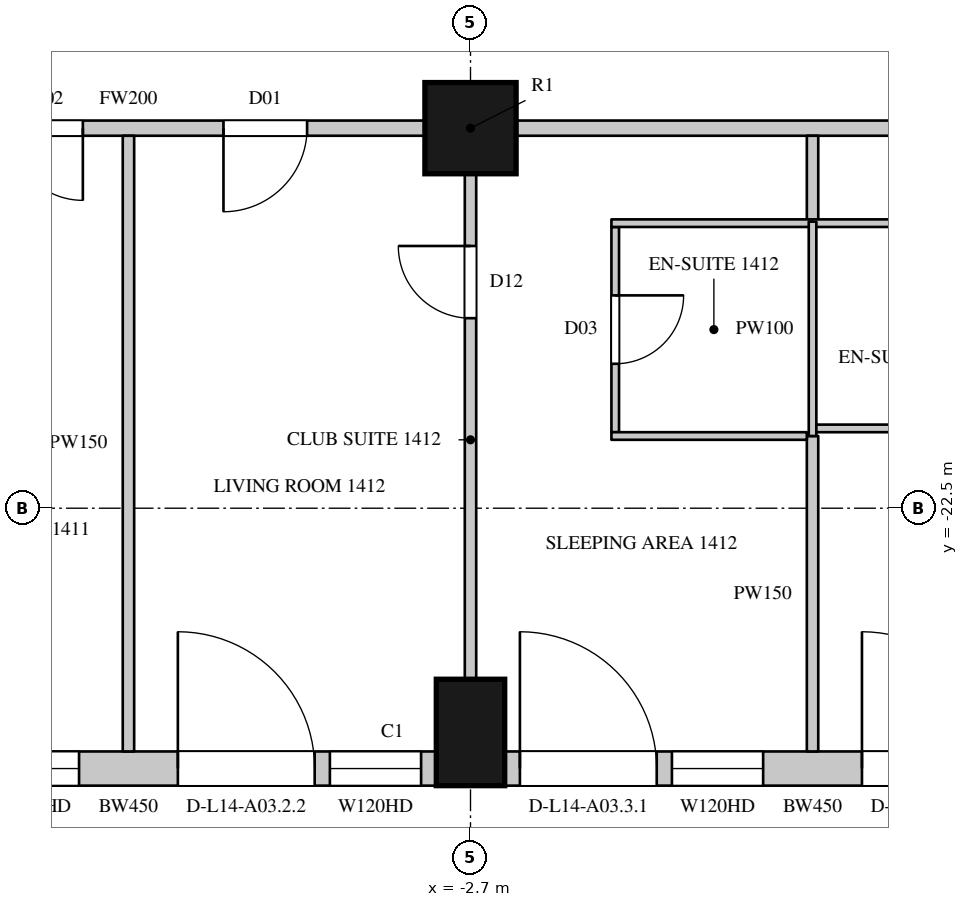
"""IFC4 building model, lengths in metres.
Left out: names, types, materials, properties, quantities, classifications, styles, units other than length and angle.
Written with IfcOpenShell. Run it as: python <this file> out.ifc"""

import sys

from ifc_helpers import new_model, si_unit, direction, frame, frame_2d, origin, origin_2d, place, context, subcontext, project, spatial, rectangle, circle, extrude, element, fill, save


model = new_model("IFC4")
c1 = context("Model", 3, precision=1e-05, world=origin(), true_north=direction((0.0, 1.0)))
c2 = subcontext(c1, "Body", "Model", "MODEL_VIEW")
j1 = project(units=[si_unit("LENGTHUNIT", "METRE"), si_unit("PLANEANGLEUNIT", "RADIAN")], contexts=[c1])
p1 = place(None, origin())
s1 = spatial("IfcSite", under=j1, at=p1, CompositionType="ELEMENT")
p2 = place(p1, origin())
s2 = spatial("IfcBuilding", under=s1, at=p2, CompositionType="ELEMENT")
p3 = place(p2, frame((0.0, 0.0, 80.7)))
s3 = spatial("IfcBuildingStorey", under=s2, at=p3, CompositionType="ELEMENT", Elevation=80.7)
p4 = place(p3, frame((-2.7, -25.45, 0.0), z_axis=(0.0, 0.0, 1.0), x_axis=(1.0, 0.0, 0.0)))
e1 = element("IfcColumn", 1, at=p4, inside=s3, PredefinedType="COLUMN", context=c2, shape_type="SweptSolid", body=[
    extrude(rectangle(XDim=0.9, YDim=1.4, at=origin_2d()), origin(), (0.0, 0.0, 1.0), 3.6),
])
p5 = place(p3, frame((-2.7, -17.5, 0.0), z_axis=(0.0, 0.0, 1.0), x_axis=(1.0, 0.0, 0.0)))
e2 = element("IfcColumn", 2, at=p5, inside=s3, PredefinedType="COLUMN", context=c2, shape_type="SweptSolid", body=[
    extrude(circle(Radius=0.6, at=origin_2d()), origin(), (0.0, 0.0, 1.0), 3.6),
])
p6 = place(p3, frame((-11.25, -25.925, 0.0), z_axis=(0.0, 0.0, 1.0), x_axis=(1.0, 0.0, 0.0)))
e3 = element("IfcWall", 3, at=p6, inside=s3, PredefinedType="SOLIDWALL", context=c2, shape_type="SweptSolid", body=[
    extrude(rectangle(XDim=8.1, YDim=0.45, at=frame_2d((4.05, 0.0))), origin(), (0.0, 0.0, 1.0), 3.3),
])
p7 = place(p6, frame((0.2, 0.0, 0.0)))
e4 = element("IfcOpeningElement", 4, at=p7, cuts=e3, PredefinedType="OPENING", context=c2, shape_type="SweptSolid", body=[
    extrude(rectangle(XDim=1.8, YDim=2.4, at=frame_2d((0.9, 1.2))), frame((0.0, 0.235, 0.0), z_axis=(0.0, -1.0, 0.0), x_axis=(1.0, 0.0, 0.0)), (0.0, 0.0, 1.0), 0.47),
])
p8 = place(p6, frame((2.2, 0.0, 1.05)))
e5 = element("IfcOpeningElement", 5, at=p8, cuts=e3, PredefinedType="OPENING", context=c2, shape_type="SweptSolid", body=[
    extrude(rectangle(XDim=1.2, YDim=2.0, at=frame_2d((0.6, 1.0))), frame((0.0, 0.235, 0.0), z_axis=(0.0, -1.0, 0.0), x_axis=(1.0, 0.0, 0.0)), (0.0, 0.0, 1.0), 0.47),
])
p9 = place(p6, frame((4.7, 0.0, 0.0)))
e6 = element("IfcOpeningElement", 6, at=p9, cuts=e3, PredefinedType="OPENING", context=c2, shape_type="SweptSolid", body=[
    extrude(rectangle(XDim=1.8, YDim=2.4, at=frame_2d((0.9, 1.2))), frame((0.0, 0.235, 0.0), z_axis=(0.0, -1.0, 0.0), x_axis=(1.0, 0.0, 0.0)), (0.0, 0.0, 1.0), 0.47),
])
p10 = place(p6, frame((6.7, 0.0, 1.05)))
e7 = element("IfcOpeningElement", 7, at=p10, cuts=e3, PredefinedType="OPENING", context=c2, shape_type="SweptSolid", body=[
    extrude(rectangle(XDim=1.2, YDim=2.0, at=frame_2d((0.6, 1.0))), frame((0.0, 0.235, 0.0), z_axis=(0.0, -1.0, 0.0), x_axis=(1.0, 0.0, 0.0)), (0.0, 0.0, 1.0), 0.47),
])
p11 = place(p3, frame((-2.25, -25.925, 0.0), z_axis=(0.0, 0.0, 1.0), x_axis=(1.0, 0.0, 0.0)))
e8 = element("IfcWall", 8, at=p11, inside=s3, PredefinedType="SOLIDWALL", context=c2, shape_type="SweptSolid", body=[
    extrude(rectangle(XDim=8.1, YDim=0.45, at=frame_2d((4.05, 0.0))), origin(), (0.0, 0.0, 1.0), 3.3),
])
p12 = place(p11, frame((0.2, 0.0, 0.0)))
e9 = element("IfcOpeningElement", 9, at=p12, cuts=e8, PredefinedType="OPENING", context=c2, shape_type="SweptSolid", body=[
    extrude(rectangle(XDim=1.8, YDim=2.4, at=frame_2d((0.9, 1.2))), frame((0.0, 0.235, 0.0), z_axis=(0.0, -1.0, 0.0), x_axis=(1.0, 0.0, 0.0)), (0.0, 0.0, 1.0), 0.47),
])
p13 = place(p11, frame((2.2, 0.0, 1.05)))
e10 = element("IfcOpeningElement", 10, at=p13, cuts=e8, PredefinedType="OPENING", context=c2, shape_type="SweptSolid", body=[
    extrude(rectangle(XDim=1.2, YDim=2.0, at=frame_2d((0.6, 1.0))), frame((0.0, 0.235, 0.0), z_axis=(0.0, -1.0, 0.0), x_axis=(1.0, 0.0, 0.0)), (0.0, 0.0, 1.0), 0.47),
])
p14 = place(p11, frame((4.7, 0.0, 0.0)))
e11 = element("IfcOpeningElement", 11, at=p14, cuts=e8, PredefinedType="OPENING", context=c2, shape_type="SweptSolid", body=[
    extrude(rectangle(XDim=1.8, YDim=2.4, at=frame_2d((0.9, 1.2))), frame((0.0, 0.235, 0.0), z_axis=(0.0, -1.0, 0.0), x_axis=(1.0, 0.0, 0.0)), (0.0, 0.0, 1.0), 0.47),
])
p15 = place(p11, frame((6.7, 0.0, 1.05)))
e12 = element("IfcOpeningElement", 12, at=p15, cuts=e8, PredefinedType="OPENING", context=c2, shape_type="SweptSolid", body=[
    extrude(rectangle(XDim=1.2, YDim=2.0, at=frame_2d((0.6, 1.0))), frame((0.0, 0.235, 0.0), z_axis=(0.0, -1.0, 0.0), x_axis=(1.0, 0.0, 0.0)), (0.0, 0.0, 1.0), 0.47),
])
p16 = place(p3, frame((-11.1, -17.5, 0.0), z_axis=(0.0, 0.0, 1.0), x_axis=(1.0, 0.0, 0.0)))
e13 = element("IfcWall", 13, at=p16, inside=s3, PredefinedType="PARTITIONING", context=c2, shape_type="SweptSolid", body=[
    extrude(rectangle(XDim=7.8, YDim=0.2, at=frame_2d((3.9, 0.0))), origin(), (0.0, 0.0, 1.0), 2.75),
])
p17 = place(p16, frame((2.35, 0.0, 0.0)))
e14 = element("IfcOpeningElement", 14, at=p17, cuts=e13, PredefinedType="OPENING", context=c2, shape_type="SweptSolid", body=[
    extrude(rectangle(XDim=0.95, YDim=2.2, at=frame_2d((0.475, 1.1))), frame((0.0, 0.11, 0.0), z_axis=(0.0, -1.0, 0.0), x_axis=(1.0, 0.0, 0.0)), (0.0, 0.0, 1.0), 0.22),
])
p18 = place(p16, frame((5.15, 0.0, 0.0)))
e15 = element("IfcOpeningElement", 15, at=p18, cuts=e13, PredefinedType="OPENING", context=c2, shape_type="SweptSolid", body=[
    extrude(rectangle(XDim=1.1, YDim=2.4, at=frame_2d((0.55, 1.2))), frame((0.0, 0.11, 0.0), z_axis=(0.0, -1.0, 0.0), x_axis=(1.0, 0.0, 0.0)), (0.0, 0.0, 1.0), 0.22),
])
p19 = place(p3, frame((-2.1, -17.5, 0.0), z_axis=(0.0, 0.0, 1.0), x_axis=(1.0, 0.0, 0.0)))
e16 = element("IfcWall", 16, at=p19, inside=s3, PredefinedType="PARTITIONING", context=c2, shape_type="SweptSolid", body=[
    extrude(rectangle(XDim=7.8, YDim=0.2, at=frame_2d((3.9, 0.0))), origin(), (0.0, 0.0, 1.0), 2.75),
])
p20 = place(p19, frame((6.55, 0.0, 0.0)))
e17 = element("IfcOpeningElement", 17, at=p20, cuts=e16, PredefinedType="OPENING", context=c2, shape_type="SweptSolid", body=[
    extrude(rectangle(XDim=0.95, YDim=2.2, at=frame_2d((0.475, 1.1))), frame((0.0, 0.11, 0.0), z_axis=(0.0, -1.0, 0.0), x_axis=(1.0, 0.0, 0.0)), (0.0, 0.0, 1.0), 0.22),
])
p21 = place(p3, frame((-7.2, -25.7, 0.0), z_axis=(0.0, 0.0, 1.0), x_axis=(0.0, 1.0, 0.0)))
e18 = element("IfcWall", 18, at=p21, inside=s3, PredefinedType="PARTITIONING", context=c2, shape_type="SweptSolid", body=[
    extrude(rectangle(XDim=8.1, YDim=0.15, at=frame_2d((4.05, 0.0))), origin(), (0.0, 0.0, 1.0), 2.65),
])
p22 = place(p3, frame((-2.7, -24.75, 0.0), z_axis=(0.0, 0.0, 1.0), x_axis=(0.0, 1.0, 0.0)))
e19 = element("IfcWall", 19, at=p22, inside=s3, PredefinedType="PARTITIONING", context=c2, shape_type="SweptSolid", body=[
    extrude(rectangle(XDim=6.65, YDim=0.15, at=frame_2d((3.325, 0.0))), origin(), (0.0, 0.0, 1.0), 2.75),
])
p23 = place(p22, frame((4.75, 0.0, 0.0)))
e20 = element("IfcOpeningElement", 20, at=p23, cuts=e19, PredefinedType="OPENING", context=c2, shape_type="SweptSolid", body=[
    extrude(rectangle(XDim=0.95, YDim=2.2, at=frame_2d((0.475, 1.1))), frame((0.0, 0.085, 0.0), z_axis=(0.0, -1.0, 0.0), x_axis=(1.0, 0.0, 0.0)), (0.0, 0.0, 1.0), 0.17),
])
p24 = place(p3, frame((1.8, -25.7, 0.0), z_axis=(0.0, 0.0, 1.0), x_axis=(0.0, 1.0, 0.0)))
e21 = element("IfcWall", 21, at=p24, inside=s3, PredefinedType="PARTITIONING", context=c2, shape_type="SweptSolid", body=[
    extrude(rectangle(XDim=4.15, YDim=0.15, at=frame_2d((2.075, 0.0))), origin(), (0.0, 0.0, 1.0), 2.65),
])
p25 = place(p3, frame((1.8, -18.73, 0.0), z_axis=(0.0, 0.0, 1.0), x_axis=(0.0, 1.0, 0.0)))
e22 = element("IfcWall", 22, at=p25, inside=s3, PredefinedType="PARTITIONING", context=c2, shape_type="SweptSolid", body=[
    extrude(rectangle(XDim=1.13, YDim=0.15, at=frame_2d((0.565, 0.0))), origin(), (0.0, 0.0, 1.0), 2.65),
])
p26 = place(p3, frame((-0.796, -21.5, 0.0), z_axis=(0.0, 0.0, 1.0), x_axis=(0.0, 1.0, 0.0)))
e23 = element("IfcWall", 23, at=p26, inside=s3, PredefinedType="PARTITIONING", context=c2, shape_type="SweptSolid", body=[
    extrude(rectangle(XDim=2.7, YDim=0.1, at=frame_2d((1.35, 0.0))), origin(), (0.0, 0.0, 1.0), 3.3),
])
p27 = place(p26, frame((0.9, 0.0, 0.0)))
e24 = element("IfcOpeningElement", 24, at=p27, cuts=e23, PredefinedType="OPENING", context=c2, shape_type="SweptSolid", body=[
    extrude(rectangle(XDim=0.9, YDim=2.2, at=frame_2d((0.45, 1.1))), frame((0.0, 0.06, 0.0), z_axis=(0.0, -1.0, 0.0), x_axis=(1.0, 0.0, 0.0)), (0.0, 0.0, 1.0), 0.12),
])
p28 = place(p3, frame((-0.846, -21.55, 0.0), z_axis=(0.0, 0.0, 1.0), x_axis=(1.0, 0.0, 0.0)))
e25 = element("IfcWall", 25, at=p28, inside=s3, PredefinedType="PARTITIONING", context=c2, shape_type="SweptSolid", body=[
    extrude(rectangle(XDim=2.571, YDim=0.1, at=frame_2d((1.286, 0.0))), origin(), (0.0, 0.0, 1.0), 3.3),
])
p29 = place(p3, frame((-0.846, -18.75, 0.0), z_axis=(0.0, 0.0, 1.0), x_axis=(1.0, 0.0, 0.0)))
e26 = element("IfcWall", 26, at=p29, inside=s3, PredefinedType="PARTITIONING", context=c2, shape_type="SweptSolid", body=[
    extrude(rectangle(XDim=5.092, YDim=0.1, at=frame_2d((2.546, 0.0))), origin(), (0.0, 0.0, 1.0), 3.3),
])
p30 = place(p29, frame((3.95, 0.0, 0.0)))
e27 = element("IfcOpeningElement", 27, at=p30, cuts=e26, PredefinedType="OPENING", context=c2, shape_type="SweptSolid", body=[
    extrude(rectangle(XDim=0.9, YDim=2.2, at=frame_2d((0.45, 1.1))), frame((0.0, 0.06, 0.0), z_axis=(0.0, -1.0, 0.0), x_axis=(1.0, 0.0, 0.0)), (0.0, 0.0, 1.0), 0.12),
])
p31 = place(p3, frame((1.8, -21.55, 0.0), z_axis=(0.0, 0.0, 1.0), x_axis=(0.0, 1.0, 0.0)))
e28 = element("IfcWall", 28, at=p31, inside=s3, PredefinedType="PARTITIONING", context=c2, shape_type="SweptSolid", body=[
    extrude(rectangle(XDim=2.82, YDim=0.1, at=frame_2d((1.41, 0.0))), origin(), (0.0, 0.0, 1.0), 2.65),
])
p32 = place(p3, frame((1.85, -21.45, 0.0), z_axis=(0.0, 0.0, 1.0), x_axis=(1.0, 0.0, 0.0)))
e29 = element("IfcWall", 29, at=p32, inside=s3, PredefinedType="PARTITIONING", context=c2, shape_type="SweptSolid", body=[
    extrude(rectangle(XDim=2.396, YDim=0.1, at=frame_2d((1.198, 0.0))), origin(), (0.0, 0.0, 1.0), 3.3),
])
p33 = place(p8, origin())
e30 = element("IfcWindow", 30, at=p33, inside=s3, PartitioningType="SINGLE_PANEL", PredefinedType="WINDOW", context=c2, shape_type="SweptSolid", body=[
    extrude(rectangle(XDim=1.2, YDim=2.0, at=frame_2d((0.6, 1.0))), frame((0.0, 0.135, 0.0), z_axis=(0.0, -1.0, 0.0), x_axis=(1.0, 0.0, 0.0)), (0.0, 0.0, 1.0), 0.06),
])
fill(e5, e30)
p34 = place(p9, origin())
e31 = element("IfcDoor", 31, at=p34, inside=s3, OperationType="SLIDING_TO_LEFT", PredefinedType="DOOR", context=c2, shape_type="SweptSolid", body=[
    extrude(rectangle(XDim=1.8, YDim=2.4, at=frame_2d((0.9, 1.2))), frame((0.0, 0.13, 0.0), z_axis=(0.0, -1.0, 0.0), x_axis=(1.0, 0.0, 0.0)), (0.0, 0.0, 1.0), 0.05),
])
fill(e6, e31)
p35 = place(p10, origin())
e32 = element("IfcWindow", 32, at=p35, inside=s3, PartitioningType="SINGLE_PANEL", PredefinedType="WINDOW", context=c2, shape_type="SweptSolid", body=[
    extrude(rectangle(XDim=1.2, YDim=2.0, at=frame_2d((0.6, 1.0))), frame((0.0, 0.135, 0.0), z_axis=(0.0, -1.0, 0.0), x_axis=(1.0, 0.0, 0.0)), (0.0, 0.0, 1.0), 0.06),
])
fill(e7, e32)
p36 = place(p12, origin())
e33 = element("IfcDoor", 33, at=p36, inside=s3, OperationType="SLIDING_TO_LEFT", PredefinedType="DOOR", context=c2, shape_type="SweptSolid", body=[
    extrude(rectangle(XDim=1.8, YDim=2.4, at=frame_2d((0.9, 1.2))), frame((0.0, 0.13, 0.0), z_axis=(0.0, -1.0, 0.0), x_axis=(1.0, 0.0, 0.0)), (0.0, 0.0, 1.0), 0.05),
])
fill(e9, e33)
p37 = place(p13, origin())
e34 = element("IfcWindow", 34, at=p37, inside=s3, PartitioningType="SINGLE_PANEL", PredefinedType="WINDOW", context=c2, shape_type="SweptSolid", body=[
    extrude(rectangle(XDim=1.2, YDim=2.0, at=frame_2d((0.6, 1.0))), frame((0.0, 0.135, 0.0), z_axis=(0.0, -1.0, 0.0), x_axis=(1.0, 0.0, 0.0)), (0.0, 0.0, 1.0), 0.06),
])
fill(e10, e34)
p38 = place(p14, origin())
e35 = element("IfcDoor", 35, at=p38, inside=s3, OperationType="SLIDING_TO_LEFT", PredefinedType="DOOR", context=c2, shape_type="SweptSolid", body=[
    extrude(rectangle(XDim=1.8, YDim=2.4, at=frame_2d((0.9, 1.2))), frame((0.0, 0.13, 0.0), z_axis=(0.0, -1.0, 0.0), x_axis=(1.0, 0.0, 0.0)), (0.0, 0.0, 1.0), 0.05),
])
fill(e11, e35)
p39 = place(p17, origin())
e36 = element("IfcDoor", 36, at=p39, inside=s3, OperationType="SINGLE_SWING_LEFT", PredefinedType="DOOR", context=c2, shape_type="SweptSolid", body=[
    extrude(rectangle(XDim=0.95, YDim=2.2, at=frame_2d((0.475, 1.1))), frame((0.0, 0.025, 0.0), z_axis=(0.0, -1.0, 0.0), x_axis=(1.0, 0.0, 0.0)), (0.0, 0.0, 1.0), 0.05),
])
fill(e14, e36)
p40 = place(p18, origin())
e37 = element("IfcDoor", 37, at=p40, inside=s3, OperationType="SINGLE_SWING_RIGHT", PredefinedType="DOOR", context=c2, shape_type="SweptSolid", body=[
    extrude(rectangle(XDim=1.1, YDim=2.4, at=frame_2d((0.55, 1.2))), frame((0.0, 0.025, 0.0), z_axis=(0.0, -1.0, 0.0), x_axis=(1.0, 0.0, 0.0)), (0.0, 0.0, 1.0), 0.05),
])
fill(e15, e37)
p41 = place(p23, origin())
e38 = element("IfcDoor", 38, at=p41, inside=s3, OperationType="SINGLE_SWING_RIGHT", PredefinedType="DOOR", context=c2, shape_type="SweptSolid", body=[
    extrude(rectangle(XDim=0.95, YDim=2.2, at=frame_2d((0.475, 1.1))), frame((0.0, 0.025, 0.0), z_axis=(0.0, -1.0, 0.0), x_axis=(1.0, 0.0, 0.0)), (0.0, 0.0, 1.0), 0.05),
])
fill(e20, e38)
p42 = place(p27, origin())
e39 = element("IfcDoor", 39, at=p42, inside=s3, OperationType="SINGLE_SWING_LEFT", PredefinedType="DOOR", context=c2, shape_type="SweptSolid", body=[
    extrude(rectangle(XDim=0.9, YDim=2.2, at=frame_2d((0.45, 1.1))), frame((0.0, 0.025, 0.0), z_axis=(0.0, -1.0, 0.0), x_axis=(1.0, 0.0, 0.0)), (0.0, 0.0, 1.0), 0.05),
])
fill(e24, e39)
save(model, sys.argv[1])
